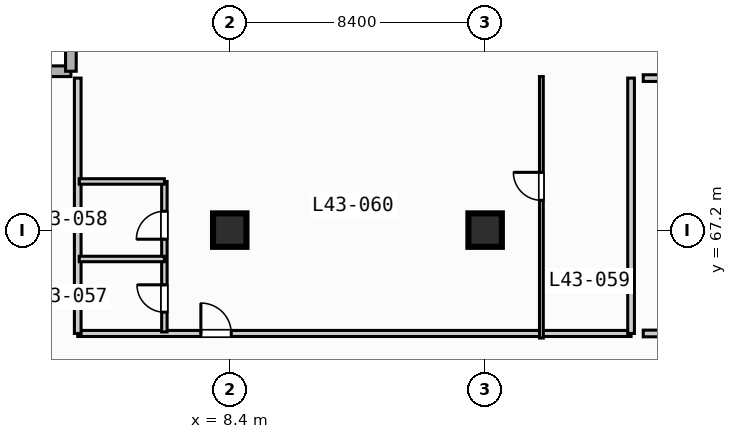
"""IFC4 building model, lengths in metres.
Left out: names, types, materials, properties, quantities, classifications, styles, units other than length and angle.
Written with IfcOpenShell. Run it as: python <this file> out.ifc"""

import sys

from ifc_helpers import new_model, si_unit, direction, frame, frame_2d, origin, origin_2d, place, context, subcontext, project, spatial, rectangle, extrude, element, fill, save


model = new_model("IFC4")
c1 = context("Model", 3, precision=1e-05, world=origin(), true_north=direction((0.0, 1.0)))
c2 = subcontext(c1, "Body", "Model", "MODEL_VIEW")
j1 = project(units=[si_unit("LENGTHUNIT", "METRE"), si_unit("PLANEANGLEUNIT", "RADIAN")], contexts=[c1])
p1 = place(None, origin())
s1 = spatial("IfcSite", under=j1, at=p1, CompositionType="ELEMENT")
p2 = place(p1, origin())
s2 = spatial("IfcBuilding", under=s1, at=p2, CompositionType="ELEMENT")
p3 = place(p2, frame((0.0, 0.0, 179.1)))
s3 = spatial("IfcBuildingStorey", under=s2, at=p3, CompositionType="ELEMENT", Elevation=179.1)
for number, where, z_axis, x_axis in (
    (1, (8.4, 67.2, 0.0), (0.0, 0.0, 1.0), (1.0, 0.0, 0.0)),
    (2, (16.8, 67.2, 0.0), (0.0, 0.0, 1.0), (1.0, 0.0, 0.0)),
):
    element("IfcColumn", number, at=place(p3, frame(where, z_axis=z_axis, x_axis=x_axis)), inside=s3, PredefinedType="COLUMN", context=c2, shape_type="SweptSolid", body=[
        extrude(rectangle(XDim=1.1, YDim=1.1, at=origin_2d()), origin(), (0.0, 0.0, 1.0), 3.7),
    ])
for number, where, z_axis, x_axis in (
    (3, (0.175, 72.425, 0.0), (0.0, 0.0, 1.0), (1.0, 0.0, 0.0)),
    (4, (3.175, 72.425, 0.0), (0.0, 0.0, 1.0), (0.0, 1.0, 0.0)),
):
    element("IfcWall", number, at=place(p3, frame(where, z_axis=z_axis, x_axis=x_axis)), inside=s3, PredefinedType="STANDARD", context=c2, shape_type="SweptSolid", body=[
        extrude(rectangle(XDim=3.0, YDim=0.35, at=frame_2d((1.5, 0.0))), origin(), (0.0, 0.0, 1.0), 3.47),
    ])
p4 = place(p3, frame((3.4, 63.8, 0.0), z_axis=(0.0, 0.0, 1.0), x_axis=(1.0, 0.0, 0.0)))
e5 = element("IfcWall", 5, at=p4, inside=s3, PredefinedType="PARTITIONING", context=c2, shape_type="SweptSolid", body=[
    extrude(rectangle(XDim=18.2, YDim=0.2, at=frame_2d((9.1, 0.0))), origin(), (0.0, 0.0, 1.0), 3.47),
])
p5 = place(p4, frame((4.05, 0.0, 0.0)))
e6 = element("IfcOpeningElement", 6, at=p5, cuts=e5, PredefinedType="OPENING", context=c2, shape_type="SweptSolid", body=[
    extrude(rectangle(XDim=1.0, YDim=2.15, at=frame_2d((0.5, 1.075))), frame((0.0, 0.11, 0.0), z_axis=(0.0, -1.0, 0.0), x_axis=(1.0, 0.0, 0.0)), (0.0, 0.0, 1.0), 0.22),
])
for number, where, z_axis, x_axis in (
    (7, (21.6, 63.8, 0.0), (0.0, 0.0, 1.0), (0.0, 1.0, 0.0)),
    (8, (3.4, 63.8, 0.0), (0.0, 0.0, 1.0), (0.0, 1.0, 0.0)),
):
    element("IfcWall", number, at=place(p3, frame(where, z_axis=z_axis, x_axis=x_axis)), inside=s3, PredefinedType="PARTITIONING", context=c2, shape_type="SweptSolid", body=[
        extrude(rectangle(XDim=8.4, YDim=0.22, at=frame_2d((4.2, 0.0))), origin(), (0.0, 0.0, 1.0), 3.47),
    ])
p6 = place(p3, frame((6.25, 63.85, 0.0), z_axis=(0.0, 0.0, 1.0), x_axis=(0.0, 1.0, 0.0)))
e9 = element("IfcWall", 9, at=p6, inside=s3, PredefinedType="PLUMBINGWALL", context=c2, shape_type="SweptSolid", body=[
    extrude(rectangle(XDim=4.95, YDim=0.18, at=frame_2d((2.475, 0.0))), origin(), (0.0, 0.0, 1.0), 3.47),
])
p7 = place(p6, frame((0.65, 0.0, 0.0)))
e10 = element("IfcOpeningElement", 10, at=p7, cuts=e9, PredefinedType="OPENING", context=c2, shape_type="SweptSolid", body=[
    extrude(rectangle(XDim=0.9, YDim=2.1, at=frame_2d((0.45, 1.05))), frame((0.0, 0.1, 0.0), z_axis=(0.0, -1.0, 0.0), x_axis=(1.0, 0.0, 0.0)), (0.0, 0.0, 1.0), 0.2),
])
p8 = place(p6, frame((3.05, 0.0, 0.0)))
e11 = element("IfcOpeningElement", 11, at=p8, cuts=e9, PredefinedType="OPENING", context=c2, shape_type="SweptSolid", body=[
    extrude(rectangle(XDim=0.92, YDim=2.1, at=frame_2d((0.46, 1.05))), frame((0.0, 0.1, 0.0), z_axis=(0.0, -1.0, 0.0), x_axis=(1.0, 0.0, 0.0)), (0.0, 0.0, 1.0), 0.2),
])
for number, where, z_axis, x_axis in (
    (12, (3.45, 66.25, 0.0), (0.0, 0.0, 1.0), (1.0, 0.0, 0.0)),
    (13, (3.45, 68.8, 0.0), (0.0, 0.0, 1.0), (1.0, 0.0, 0.0)),
):
    element("IfcWall", number, at=place(p3, frame(where, z_axis=z_axis, x_axis=x_axis)), inside=s3, PredefinedType="PLUMBINGWALL", context=c2, shape_type="SweptSolid", body=[
        extrude(rectangle(XDim=2.8, YDim=0.18, at=frame_2d((1.4, 0.0))), origin(), (0.0, 0.0, 1.0), 3.47),
    ])
p9 = place(p3, frame((18.65, 63.65, 0.0), z_axis=(0.0, 0.0, 1.0), x_axis=(0.0, 1.0, 0.0)))
e14 = element("IfcWall", 14, at=p9, inside=s3, PredefinedType="PARTITIONING", context=c2, shape_type="SweptSolid", body=[
    extrude(rectangle(XDim=8.6, YDim=0.125, at=frame_2d((4.3, 0.0))), origin(), (0.0, 0.0, 1.0), 3.47),
])
p10 = place(p9, frame((4.53, 0.0, 0.0)))
e15 = element("IfcOpeningElement", 15, at=p10, cuts=e14, PredefinedType="OPENING", context=c2, shape_type="SweptSolid", body=[
    extrude(rectangle(XDim=0.92, YDim=2.1, at=frame_2d((0.46, 1.05))), frame((0.0, 0.073, 0.0), z_axis=(0.0, -1.0, 0.0), x_axis=(1.0, 0.0, 0.0)), (0.0, 0.0, 1.0), 0.145),
])
p11 = place(p3, frame((22.0, 72.2, 0.0), z_axis=(0.0, 0.0, 1.0), x_axis=(1.0, 0.0, 0.0)))
e16 = element("IfcWall", 16, at=p11, inside=s3, PredefinedType="PARTITIONING", context=c2, shape_type="SweptSolid", body=[
    extrude(rectangle(XDim=11.3, YDim=0.22, at=frame_2d((5.65, 0.0))), origin(), (0.0, 0.0, 1.0), 3.47),
])
p12 = place(p3, frame((22.0, 63.8, 0.0), z_axis=(0.0, 0.0, 1.0), x_axis=(1.0, 0.0, 0.0)))
e17 = element("IfcWall", 17, at=p12, inside=s3, PredefinedType="PARTITIONING", context=c2, shape_type="SweptSolid", body=[
    extrude(rectangle(XDim=6.0, YDim=0.22, at=frame_2d((3.0, 0.0))), origin(), (0.0, 0.0, 1.0), 3.47),
])
p13 = place(p5, origin())
e18 = element("IfcDoor", 18, at=p13, inside=s3, OperationType="SINGLE_SWING_LEFT", PredefinedType="DOOR", context=c2, shape_type="SweptSolid", body=[
    extrude(rectangle(XDim=1.0, YDim=2.15, at=frame_2d((0.5, 1.075))), frame((0.0, 0.025, 0.0), z_axis=(0.0, -1.0, 0.0), x_axis=(1.0, 0.0, 0.0)), (0.0, 0.0, 1.0), 0.05),
])
fill(e6, e18)
p14 = place(p7, origin())
e19 = element("IfcDoor", 19, at=p14, inside=s3, OperationType="SINGLE_SWING_RIGHT", PredefinedType="DOOR", context=c2, shape_type="SweptSolid", body=[
    extrude(rectangle(XDim=0.9, YDim=2.1, at=frame_2d((0.45, 1.05))), frame((0.0, 0.025, 0.0), z_axis=(0.0, -1.0, 0.0), x_axis=(1.0, 0.0, 0.0)), (0.0, 0.0, 1.0), 0.05),
])
fill(e10, e19)
p15 = place(p8, origin())
e20 = element("IfcDoor", 20, at=p15, inside=s3, OperationType="SINGLE_SWING_LEFT", PredefinedType="DOOR", context=c2, shape_type="SweptSolid", body=[
    extrude(rectangle(XDim=0.92, YDim=2.1, at=frame_2d((0.46, 1.05))), frame((0.0, 0.025, 0.0), z_axis=(0.0, -1.0, 0.0), x_axis=(1.0, 0.0, 0.0)), (0.0, 0.0, 1.0), 0.05),
])
fill(e11, e20)
p16 = place(p10, origin())
e21 = element("IfcDoor", 21, at=p16, inside=s3, OperationType="SINGLE_SWING_RIGHT", PredefinedType="DOOR", context=c2, shape_type="SweptSolid", body=[
    extrude(rectangle(XDim=0.92, YDim=2.1, at=frame_2d((0.46, 1.05))), frame((0.0, 0.025, 0.0), z_axis=(0.0, -1.0, 0.0), x_axis=(1.0, 0.0, 0.0)), (0.0, 0.0, 1.0), 0.05),
])
fill(e15, e21)
save(model, sys.argv[1])
